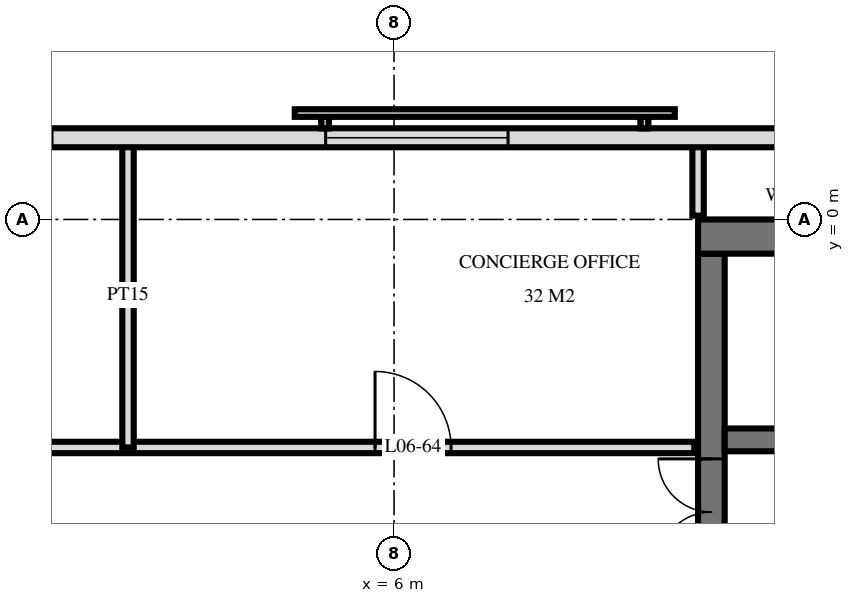
"""IFC4 building model, lengths in metres.
Left out: names, types, materials, properties, quantities, classifications, styles, units other than length and angle.
Written with IfcOpenShell. Run it as: python <this file> out.ifc"""

import sys

from ifc_helpers import new_model, si_unit, direction, frame, frame_2d, origin, place, context, subcontext, project, spatial, rectangle, extrude, element, fill, save


model = new_model("IFC4")
c1 = context("Model", 3, precision=1e-05, world=origin(), true_north=direction((0.0, 1.0)))
c2 = subcontext(c1, "Body", "Model", "MODEL_VIEW")
j1 = project(units=[si_unit("LENGTHUNIT", "METRE"), si_unit("PLANEANGLEUNIT", "RADIAN")], contexts=[c1])
p1 = place(None, origin())
s1 = spatial("IfcSite", under=j1, at=p1, CompositionType="ELEMENT")
p2 = place(p1, origin())
s2 = spatial("IfcBuilding", under=s1, at=p2, CompositionType="ELEMENT")
p3 = place(p2, frame((0.0, 0.0, 31.2)))
s3 = spatial("IfcBuildingStorey", under=s2, at=p3, CompositionType="ELEMENT", Elevation=31.2)
p4 = place(p3, frame((10.0, -0.225, 0.0), z_axis=(0.0, 0.0, 1.0), x_axis=(1.0, 0.0, 0.0)))
e1 = element("IfcWall", 1, at=p4, inside=s3, PredefinedType="SHEAR", context=c2, shape_type="SweptSolid", body=[
    extrude(rectangle(XDim=19.5, YDim=0.45, at=frame_2d((9.75, 0.0))), origin(), (0.0, 0.0, 1.0), 3.6),
])
p5 = place(p3, frame((10.175, -14.55, 0.0), z_axis=(0.0, 0.0, 1.0), x_axis=(0.0, 1.0, 0.0)))
e2 = element("IfcWall", 2, at=p5, inside=s3, PredefinedType="SHEAR", context=c2, shape_type="SweptSolid", body=[
    extrude(rectangle(XDim=14.1, YDim=0.35, at=frame_2d((7.05, 0.0))), origin(), (0.0, 0.0, 1.0), 3.6),
])
p6 = place(p5, frame((8.4, 0.0, 0.0)))
e3 = element("IfcOpeningElement", 3, at=p6, cuts=e2, PredefinedType="OPENING", context=c2, shape_type="SweptSolid", body=[
    extrude(rectangle(XDim=1.4, YDim=2.4, at=frame_2d((0.7, 1.2))), frame((0.0, 0.185, 0.0), z_axis=(0.0, -1.0, 0.0), x_axis=(1.0, 0.0, 0.0)), (0.0, 0.0, 1.0), 0.37),
])
p7 = place(p5, frame((10.0, 0.0, 0.0)))
e4 = element("IfcOpeningElement", 4, at=p7, cuts=e2, PredefinedType="OPENING", context=c2, shape_type="SweptSolid", body=[
    extrude(rectangle(XDim=1.4, YDim=2.4, at=frame_2d((0.7, 1.2))), frame((0.0, 0.185, 0.0), z_axis=(0.0, -1.0, 0.0), x_axis=(1.0, 0.0, 0.0)), (0.0, 0.0, 1.0), 0.37),
])
p8 = place(p5, frame((4.0, 0.0, 0.0)))
e5 = element("IfcOpeningElement", 5, at=p8, cuts=e2, PredefinedType="OPENING", context=c2, shape_type="SweptSolid", body=[
    extrude(rectangle(XDim=1.2, YDim=2.1, at=frame_2d((0.6, 1.05))), frame((0.0, 0.185, 0.0), z_axis=(0.0, -1.0, 0.0), x_axis=(1.0, 0.0, 0.0)), (0.0, 0.0, 1.0), 0.37),
])
p9 = place(p3, frame((10.35, -2.9, 0.0), z_axis=(0.0, 0.0, 1.0), x_axis=(1.0, 0.0, 0.0)))
e6 = element("IfcWall", 6, at=p9, inside=s3, PredefinedType="SHEAR", context=c2, shape_type="SweptSolid", body=[
    extrude(rectangle(XDim=18.7, YDim=0.3, at=frame_2d((9.35, 0.0))), origin(), (0.0, 0.0, 1.0), 3.6),
])
p10 = place(p9, frame((14.65, 0.0, 0.0)))
e7 = element("IfcOpeningElement", 7, at=p10, cuts=e6, PredefinedType="OPENING", context=c2, shape_type="SweptSolid", body=[
    extrude(rectangle(XDim=1.1, YDim=2.1, at=frame_2d((0.55, 1.05))), frame((0.0, 0.16, 0.0), z_axis=(0.0, -1.0, 0.0), x_axis=(1.0, 0.0, 0.0)), (0.0, 0.0, 1.0), 0.32),
])
p11 = place(p9, frame((17.05, 0.0, 0.0)))
e8 = element("IfcOpeningElement", 8, at=p11, cuts=e6, PredefinedType="OPENING", context=c2, shape_type="SweptSolid", body=[
    extrude(rectangle(XDim=1.1, YDim=2.1, at=frame_2d((0.55, 1.05))), frame((0.0, 0.16, 0.0), z_axis=(0.0, -1.0, 0.0), x_axis=(1.0, 0.0, 0.0)), (0.0, 0.0, 1.0), 0.32),
])
p12 = place(p9, frame((5.938, 0.0, 0.0)))
e9 = element("IfcOpeningElement", 9, at=p12, cuts=e6, PredefinedType="OPENING", context=c2, shape_type="SweptSolid", body=[
    extrude(rectangle(XDim=0.9, YDim=2.1, at=frame_2d((0.45, 1.05))), frame((0.0, 0.16, 0.0), z_axis=(0.0, -1.0, 0.0), x_axis=(1.0, 0.0, 0.0)), (0.0, 0.0, 1.0), 0.32),
])
p13 = place(p9, frame((7.363, 0.0, 0.0)))
e10 = element("IfcOpeningElement", 10, at=p13, cuts=e6, PredefinedType="OPENING", context=c2, shape_type="SweptSolid", body=[
    extrude(rectangle(XDim=0.9, YDim=2.1, at=frame_2d((0.45, 1.05))), frame((0.0, 0.16, 0.0), z_axis=(0.0, -1.0, 0.0), x_axis=(1.0, 0.0, 0.0)), (0.0, 0.0, 1.0), 0.32),
])
p14 = place(p9, frame((0.85, 0.0, 0.0)))
e11 = element("IfcOpeningElement", 11, at=p14, cuts=e6, PredefinedType="OPENING", context=c2, shape_type="SweptSolid", body=[
    extrude(rectangle(XDim=1.0, YDim=2.1, at=frame_2d((0.5, 1.05))), frame((0.0, 0.16, 0.0), z_axis=(0.0, -1.0, 0.0), x_axis=(1.0, 0.0, 0.0)), (0.0, 0.0, 1.0), 0.32),
])
p15 = place(p9, frame((3.137, 0.0, 0.0)))
e12 = element("IfcOpeningElement", 12, at=p15, cuts=e6, PredefinedType="OPENING", context=c2, shape_type="SweptSolid", body=[
    extrude(rectangle(XDim=1.0, YDim=2.1, at=frame_2d((0.5, 1.05))), frame((0.0, 0.16, 0.0), z_axis=(0.0, -1.0, 0.0), x_axis=(1.0, 0.0, 0.0)), (0.0, 0.0, 1.0), 0.32),
])
p16 = place(p9, frame((4.562, 0.0, 0.0)))
e13 = element("IfcOpeningElement", 13, at=p16, cuts=e6, PredefinedType="OPENING", context=c2, shape_type="SweptSolid", body=[
    extrude(rectangle(XDim=1.0, YDim=2.1, at=frame_2d((0.5, 1.05))), frame((0.0, 0.16, 0.0), z_axis=(0.0, -1.0, 0.0), x_axis=(1.0, 0.0, 0.0)), (0.0, 0.0, 1.0), 0.32),
])
p17 = place(p9, frame((12.1, 0.0, 0.0)))
e14 = element("IfcOpeningElement", 14, at=p17, cuts=e6, PredefinedType="OPENING", context=c2, shape_type="SweptSolid", body=[
    extrude(rectangle(XDim=1.0, YDim=2.1, at=frame_2d((0.5, 1.05))), frame((0.0, 0.16, 0.0), z_axis=(0.0, -1.0, 0.0), x_axis=(1.0, 0.0, 0.0)), (0.0, 0.0, 1.0), 0.32),
])
p18 = place(p3, frame((28.775, 1.075, 0.0), z_axis=(0.0, 0.0, 1.0), x_axis=(-1.0, 0.0, 0.0)))
e15 = element("IfcWall", 15, at=p18, inside=s3, PredefinedType="SOLIDWALL", context=c2, shape_type="SweptSolid", body=[
    extrude(rectangle(XDim=57.551, YDim=0.25, at=frame_2d((28.775, 0.0))), origin(), (0.0, 0.0, 1.0), 3.32),
])
p19 = place(p18, frame((21.275, 0.0, 0.3)))
e16 = element("IfcOpeningElement", 16, at=p19, cuts=e15, PredefinedType="OPENING", context=c2, shape_type="SweptSolid", body=[
    extrude(rectangle(XDim=2.4, YDim=2.1, at=frame_2d((1.2, 1.05))), frame((0.0, 0.135, 0.0), z_axis=(0.0, -1.0, 0.0), x_axis=(1.0, 0.0, 0.0)), (0.0, 0.0, 1.0), 0.27),
])
p20 = place(p18, frame((27.275, 0.0, 0.3)))
e17 = element("IfcOpeningElement", 17, at=p20, cuts=e15, PredefinedType="OPENING", context=c2, shape_type="SweptSolid", body=[
    extrude(rectangle(XDim=2.4, YDim=2.1, at=frame_2d((1.2, 1.05))), frame((0.0, 0.135, 0.0), z_axis=(0.0, -1.0, 0.0), x_axis=(1.0, 0.0, 0.0)), (0.0, 0.0, 1.0), 0.27),
])
p21 = place(p18, frame((30.275, 0.0, 0.3)))
e18 = element("IfcOpeningElement", 18, at=p21, cuts=e15, PredefinedType="OPENING", context=c2, shape_type="SweptSolid", body=[
    extrude(rectangle(XDim=2.4, YDim=2.1, at=frame_2d((1.2, 1.05))), frame((0.0, 0.135, 0.0), z_axis=(0.0, -1.0, 0.0), x_axis=(1.0, 0.0, 0.0)), (0.0, 0.0, 1.0), 0.27),
])
p22 = place(p3, frame((10.0, 0.05, 0.0), z_axis=(0.0, 0.0, 1.0), x_axis=(0.0, 1.0, 0.0)))
e19 = element("IfcWall", 19, at=p22, inside=s3, PredefinedType="PARTITIONING", context=c2, shape_type="SweptSolid", body=[
    extrude(rectangle(XDim=0.97, YDim=0.15, at=frame_2d((0.485, 0.0))), origin(), (0.0, 0.0, 1.0), 3.32),
])
p23 = place(p3, frame((2.5, -3.0, 0.0), z_axis=(0.0, 0.0, 1.0), x_axis=(0.0, 1.0, 0.0)))
e20 = element("IfcWall", 20, at=p23, inside=s3, PredefinedType="PARTITIONING", context=c2, shape_type="SweptSolid", body=[
    extrude(rectangle(XDim=4.02, YDim=0.15, at=frame_2d((2.01, 0.0))), origin(), (0.0, 0.0, 1.0), 3.32),
])
p24 = place(p3, frame((-9.95, -3.0, 0.0), z_axis=(0.0, 0.0, 1.0), x_axis=(1.0, 0.0, 0.0)))
e21 = element("IfcWall", 21, at=p24, inside=s3, PredefinedType="PARTITIONING", context=c2, shape_type="SweptSolid", body=[
    extrude(rectangle(XDim=19.9, YDim=0.15, at=frame_2d((9.95, 0.0))), origin(), (0.0, 0.0, 1.0), 3.32),
])
p25 = place(p24, frame((0.95, 0.0, 0.0)))
e22 = element("IfcOpeningElement", 22, at=p25, cuts=e21, PredefinedType="OPENING", context=c2, shape_type="SweptSolid", body=[
    extrude(rectangle(XDim=1.0, YDim=2.1, at=frame_2d((0.5, 1.05))), frame((0.0, 0.085, 0.0), z_axis=(0.0, -1.0, 0.0), x_axis=(1.0, 0.0, 0.0)), (0.0, 0.0, 1.0), 0.17),
])
p26 = place(p24, frame((3.7, 0.0, 0.0)))
e23 = element("IfcOpeningElement", 23, at=p26, cuts=e21, PredefinedType="OPENING", context=c2, shape_type="SweptSolid", body=[
    extrude(rectangle(XDim=1.0, YDim=2.1, at=frame_2d((0.5, 1.05))), frame((0.0, 0.085, 0.0), z_axis=(0.0, -1.0, 0.0), x_axis=(1.0, 0.0, 0.0)), (0.0, 0.0, 1.0), 0.17),
])
p27 = place(p24, frame((8.45, 0.0, 0.0)))
e24 = element("IfcOpeningElement", 24, at=p27, cuts=e21, PredefinedType="OPENING", context=c2, shape_type="SweptSolid", body=[
    extrude(rectangle(XDim=1.0, YDim=2.1, at=frame_2d((0.5, 1.05))), frame((0.0, 0.085, 0.0), z_axis=(0.0, -1.0, 0.0), x_axis=(1.0, 0.0, 0.0)), (0.0, 0.0, 1.0), 0.17),
])
p28 = place(p24, frame((15.7, 0.0, 0.0)))
e25 = element("IfcOpeningElement", 25, at=p28, cuts=e21, PredefinedType="OPENING", context=c2, shape_type="SweptSolid", body=[
    extrude(rectangle(XDim=1.0, YDim=2.1, at=frame_2d((0.5, 1.05))), frame((0.0, 0.085, 0.0), z_axis=(0.0, -1.0, 0.0), x_axis=(1.0, 0.0, 0.0)), (0.0, 0.0, 1.0), 0.17),
])
p29 = place(p19, origin())
e26 = element("IfcWindow", 26, at=p29, inside=s3, PartitioningType="SINGLE_PANEL", PredefinedType="WINDOW", context=c2, shape_type="SweptSolid", body=[
    extrude(rectangle(XDim=2.4, YDim=2.1, at=frame_2d((1.2, 1.05))), frame((0.0, 0.03, 0.0), z_axis=(0.0, -1.0, 0.0), x_axis=(1.0, 0.0, 0.0)), (0.0, 0.0, 1.0), 0.06),
])
fill(e16, e26)
p30 = place(p7, origin())
e27 = element("IfcDoor", 27, at=p30, inside=s3, OperationType="DOUBLE_DOOR_SINGLE_SWING", PredefinedType="DOOR", context=c2, shape_type="SweptSolid", body=[
    extrude(rectangle(XDim=1.4, YDim=2.4, at=frame_2d((0.7, 1.2))), frame((0.0, 0.025, 0.0), z_axis=(0.0, -1.0, 0.0), x_axis=(1.0, 0.0, 0.0)), (0.0, 0.0, 1.0), 0.05),
])
fill(e4, e27)
p31 = place(p28, origin())
e28 = element("IfcDoor", 28, at=p31, inside=s3, OperationType="SINGLE_SWING_RIGHT", PredefinedType="DOOR", context=c2, shape_type="SweptSolid", body=[
    extrude(rectangle(XDim=1.0, YDim=2.1, at=frame_2d((0.5, 1.05))), frame((0.0, 0.025, 0.0), z_axis=(0.0, -1.0, 0.0), x_axis=(1.0, 0.0, 0.0)), (0.0, 0.0, 1.0), 0.05),
])
fill(e25, e28)
save(model, sys.argv[1])
